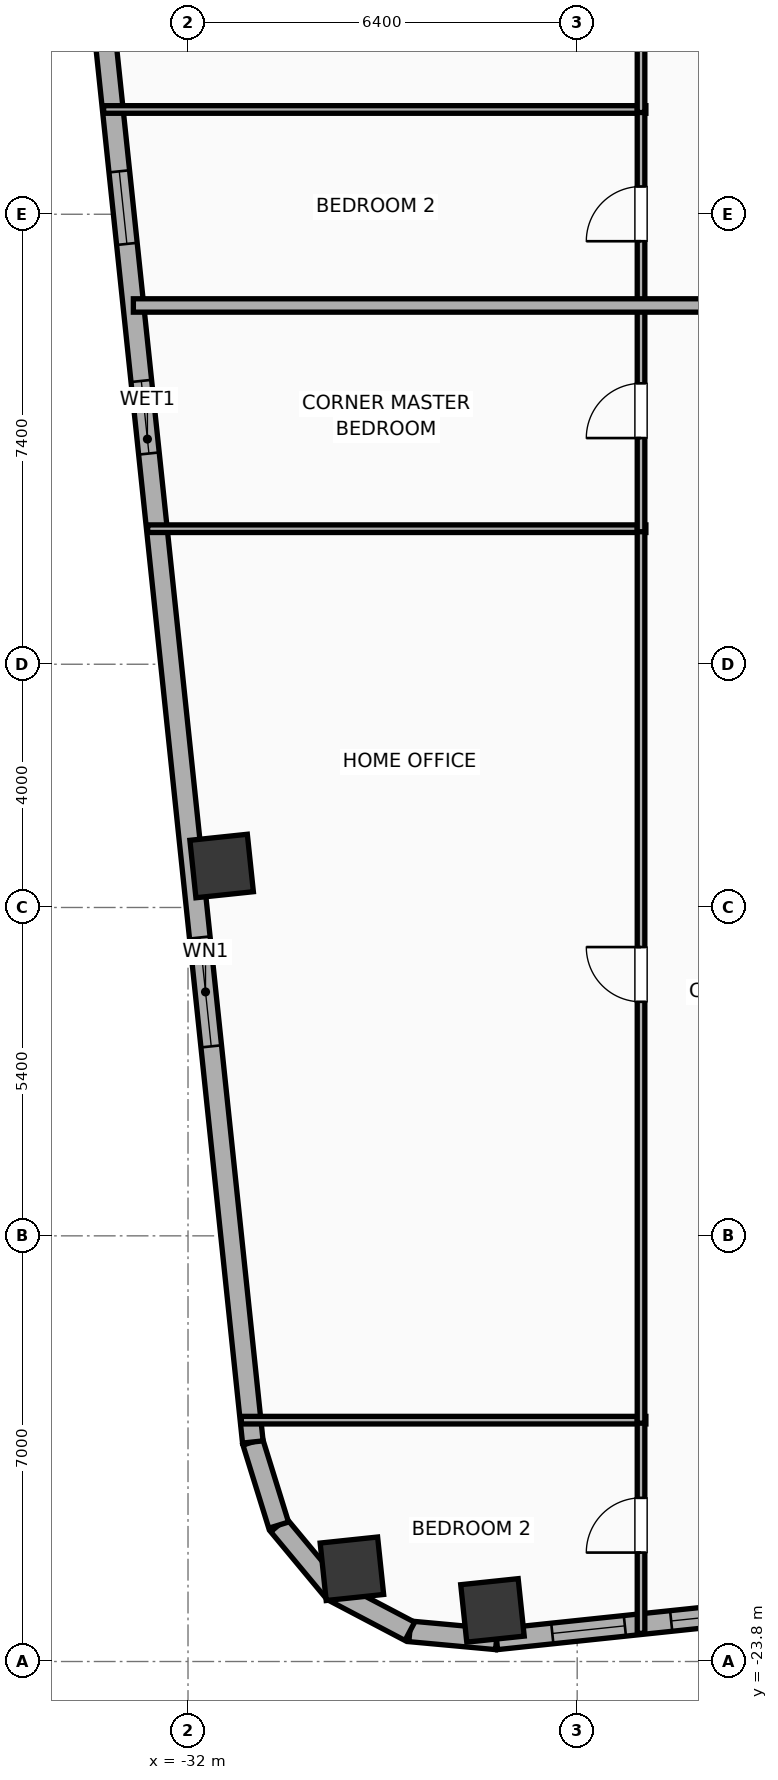
"""IFC4 building model, lengths in metres.
Left out: names, types, materials, properties, quantities, classifications, styles, units other than length and angle.
Written with IfcOpenShell. Run it as: python <this file> out.ifc"""

import sys

from ifc_helpers import new_model, si_unit, direction, frame, frame_2d, origin, origin_2d, place, context, subcontext, project, spatial, rectangle, hollow_rectangle, hollow_circle, extrude, element, fill, save


model = new_model("IFC4")
c1 = context("Model", 3, precision=1e-05, world=origin(), true_north=direction((0.0, 1.0)))
c2 = subcontext(c1, "Body", "Model", "MODEL_VIEW")
j1 = project(units=[si_unit("LENGTHUNIT", "METRE"), si_unit("PLANEANGLEUNIT", "RADIAN")], contexts=[c1])
p1 = place(None, origin())
s1 = spatial("IfcSite", under=j1, at=p1, CompositionType="ELEMENT")
p2 = place(p1, origin())
s2 = spatial("IfcBuilding", under=s1, at=p2, CompositionType="ELEMENT")
p3 = place(p2, frame((0.0, 0.0, 163.8)))
s3 = spatial("IfcBuildingStorey", under=s2, at=p3, CompositionType="ELEMENT", Elevation=163.8)
for number, where, z_axis, x_axis in (
    (1, (-26.993, -22.959, 0.0), (0.0, 0.0, 1.0), (0.995, 0.105, 0.0)),
    (2, (-31.447, -10.718, 0.0), (0.0, 0.0, 1.0), (0.995, 0.105, 0.0)),
):
    element("IfcColumn", number, at=place(p3, frame(where, z_axis=z_axis, x_axis=x_axis)), inside=s3, PredefinedType="COLUMN", context=c2, shape_type="SweptSolid", body=[
        extrude(hollow_rectangle(XDim=0.95, YDim=0.95, WallThickness=0.032, at=origin_2d()), origin(), (0.0, 0.0, 1.0), 3.9),
    ])
p4 = place(p3, frame((-29.305, -22.275, 0.0), z_axis=(0.0, 0.0, 1.0), x_axis=(0.994521895368, 0.104528463268, 0.0)))
e3 = element("IfcColumn", 3, at=p4, inside=s3, PredefinedType="COLUMN", context=c2, shape_type="SweptSolid", body=[
    extrude(hollow_circle(Radius=0.475, WallThickness=0.032, at=origin_2d()), origin(), (0.0, 0.0, 1.0), 3.9),
])
p5 = place(p3, frame((24.756, -18.003, 0.0), z_axis=(0.0, 0.0, 1.0), x_axis=(-0.99452160744, -0.104531202687, 0.0)))
e4 = element("IfcWall", 4, at=p5, inside=s3, PredefinedType="ELEMENTEDWALL", context=c2, shape_type="SweptSolid", body=[
    extrude(rectangle(XDim=51.967, YDim=0.34, at=frame_2d((25.983, 0.0))), origin(), (0.0, 0.0, 1.0), 3.65),
])
p6 = place(p5, frame((25.633, 0.0, 0.75)))
e5 = element("IfcOpeningElement", 5, at=p6, cuts=e4, PredefinedType="OPENING", context=c2, shape_type="SweptSolid", body=[
    extrude(rectangle(XDim=2.4, YDim=2.1, at=frame_2d((1.2, 1.05))), frame((0.0, 0.18, 0.0), z_axis=(0.0, -1.0, 0.0), x_axis=(1.0, 0.0, 0.0)), (0.0, 0.0, 1.0), 0.36),
])
p7 = place(p5, frame((42.369, 0.0, 0.75)))
e6 = element("IfcOpeningElement", 6, at=p7, cuts=e4, PredefinedType="OPENING", context=c2, shape_type="SweptSolid", body=[
    extrude(rectangle(XDim=1.2, YDim=2.05, at=frame_2d((0.6, 1.025))), frame((0.0, 0.18, 0.0), z_axis=(0.0, -1.0, 0.0), x_axis=(1.0, 0.0, 0.0)), (0.0, 0.0, 1.0), 0.36),
])
p8 = place(p5, frame((34.085, 0.0, 0.75)))
e7 = element("IfcOpeningElement", 7, at=p8, cuts=e4, PredefinedType="OPENING", context=c2, shape_type="SweptSolid", body=[
    extrude(rectangle(XDim=1.2, YDim=2.05, at=frame_2d((0.6, 1.025))), frame((0.0, 0.18, 0.0), z_axis=(0.0, -1.0, 0.0), x_axis=(1.0, 0.0, 0.0)), (0.0, 0.0, 1.0), 0.36),
])
p9 = place(p5, frame((36.993, 0.0, 0.75)))
e8 = element("IfcOpeningElement", 8, at=p9, cuts=e4, PredefinedType="OPENING", context=c2, shape_type="SweptSolid", body=[
    extrude(rectangle(XDim=1.2, YDim=2.05, at=frame_2d((0.6, 1.025))), frame((0.0, 0.18, 0.0), z_axis=(0.0, -1.0, 0.0), x_axis=(1.0, 0.0, 0.0)), (0.0, 0.0, 1.0), 0.36),
])
p10 = place(p5, frame((14.397, 0.0, 0.75)))
e9 = element("IfcOpeningElement", 9, at=p10, cuts=e4, PredefinedType="OPENING", context=c2, shape_type="SweptSolid", body=[
    extrude(rectangle(XDim=1.2, YDim=2.05, at=frame_2d((0.6, 1.025))), frame((0.0, 0.18, 0.0), z_axis=(0.0, -1.0, 0.0), x_axis=(1.0, 0.0, 0.0)), (0.0, 0.0, 1.0), 0.36),
])
p11 = place(p5, frame((11.489, 0.0, 0.75)))
e10 = element("IfcOpeningElement", 10, at=p11, cuts=e4, PredefinedType="OPENING", context=c2, shape_type="SweptSolid", body=[
    extrude(rectangle(XDim=1.2, YDim=2.05, at=frame_2d((0.6, 1.025))), frame((0.0, 0.18, 0.0), z_axis=(0.0, -1.0, 0.0), x_axis=(1.0, 0.0, 0.0)), (0.0, 0.0, 1.0), 0.36),
])
p12 = place(p5, frame((8.521, 0.0, 0.75)))
e11 = element("IfcOpeningElement", 11, at=p12, cuts=e4, PredefinedType="OPENING", context=c2, shape_type="SweptSolid", body=[
    extrude(rectangle(XDim=1.2, YDim=2.05, at=frame_2d((0.6, 1.025))), frame((0.0, 0.18, 0.0), z_axis=(0.0, -1.0, 0.0), x_axis=(1.0, 0.0, 0.0)), (0.0, 0.0, 1.0), 0.36),
])
p13 = place(p5, frame((5.582, 0.0, 0.75)))
e12 = element("IfcOpeningElement", 12, at=p13, cuts=e4, PredefinedType="OPENING", context=c2, shape_type="SweptSolid", body=[
    extrude(rectangle(XDim=1.2, YDim=2.05, at=frame_2d((0.6, 1.025))), frame((0.0, 0.18, 0.0), z_axis=(0.0, -1.0, 0.0), x_axis=(1.0, 0.0, 0.0)), (0.0, 0.0, 1.0), 0.36),
])
p14 = place(p5, frame((29.313, 0.0, 0.75)))
e13 = element("IfcOpeningElement", 13, at=p14, cuts=e4, PredefinedType="OPENING", context=c2, shape_type="SweptSolid", body=[
    extrude(rectangle(XDim=1.2, YDim=2.05, at=frame_2d((0.6, 1.025))), frame((0.0, 0.18, 0.0), z_axis=(0.0, -1.0, 0.0), x_axis=(1.0, 0.0, 0.0)), (0.0, 0.0, 1.0), 0.36),
])
p15 = place(p5, frame((22.248, 0.0, 0.75)))
e14 = element("IfcOpeningElement", 14, at=p15, cuts=e4, PredefinedType="OPENING", context=c2, shape_type="SweptSolid", body=[
    extrude(rectangle(XDim=1.2, YDim=2.05, at=frame_2d((0.6, 1.025))), frame((0.0, 0.18, 0.0), z_axis=(0.0, -1.0, 0.0), x_axis=(1.0, 0.0, 0.0)), (0.0, 0.0, 1.0), 0.36),
])
p16 = place(p5, frame((18.186, 0.0, 0.75)))
e15 = element("IfcOpeningElement", 15, at=p16, cuts=e4, PredefinedType="OPENING", context=c2, shape_type="SweptSolid", body=[
    extrude(rectangle(XDim=1.2, YDim=2.05, at=frame_2d((0.6, 1.025))), frame((0.0, 0.18, 0.0), z_axis=(0.0, -1.0, 0.0), x_axis=(1.0, 0.0, 0.0)), (0.0, 0.0, 1.0), 0.36),
])
p17 = place(p5, frame((47.879, 0.0, 0.75)))
e16 = element("IfcOpeningElement", 16, at=p17, cuts=e4, PredefinedType="OPENING", context=c2, shape_type="SweptSolid", body=[
    extrude(rectangle(XDim=1.2, YDim=2.05, at=frame_2d((0.6, 1.025))), frame((0.0, 0.18, 0.0), z_axis=(0.0, -1.0, 0.0), x_axis=(1.0, 0.0, 0.0)), (0.0, 0.0, 1.0), 0.36),
])
p18 = place(p5, frame((49.844, 0.0, 0.75)))
e17 = element("IfcOpeningElement", 17, at=p18, cuts=e4, PredefinedType="OPENING", context=c2, shape_type="SweptSolid", body=[
    extrude(rectangle(XDim=1.2, YDim=2.05, at=frame_2d((0.6, 1.025))), frame((0.0, 0.18, 0.0), z_axis=(0.0, -1.0, 0.0), x_axis=(1.0, 0.0, 0.0)), (0.0, 0.0, 1.0), 0.36),
])
p19 = place(p3, frame((-26.926, -23.435, 0.0), z_axis=(0.0, 0.0, 1.0), x_axis=(-0.995800460351, 0.091550222087, 0.0)))
e18 = element("IfcWall", 18, at=p19, inside=s3, PredefinedType="ELEMENTEDWALL", context=c2, shape_type="SweptSolid", body=[
    extrude(rectangle(XDim=1.432, YDim=0.34, at=frame_2d((0.716, 0.0))), origin(), (0.0, 0.0, 1.0), 3.65),
])
p20 = place(p3, frame((-28.352, -23.304, 0.0), z_axis=(0.0, 0.0, 1.0), x_axis=(-0.884989312682, 0.465611336243, 0.0)))
e19 = element("IfcWall", 19, at=p20, inside=s3, PredefinedType="ELEMENTEDWALL", context=c2, shape_type="SweptSolid", body=[
    extrude(rectangle(XDim=1.415, YDim=0.34, at=frame_2d((0.708, 0.0))), origin(), (0.0, 0.0, 1.0), 3.65),
])
p21 = place(p3, frame((-29.605, -22.645, 0.0), z_axis=(0.0, 0.0, 1.0), x_axis=(-0.639437361921, 0.768843196093, 0.0)))
e20 = element("IfcWall", 20, at=p21, inside=s3, PredefinedType="ELEMENTEDWALL", context=c2, shape_type="SweptSolid", body=[
    extrude(rectangle(XDim=1.415, YDim=0.34, at=frame_2d((0.708, 0.0))), origin(), (0.0, 0.0, 1.0), 3.65),
])
p22 = place(p3, frame((-30.51, -21.557, 0.0), z_axis=(0.0, 0.0, 1.0), x_axis=(-0.296624409546, 0.9549942197, 0.0)))
e21 = element("IfcWall", 21, at=p22, inside=s3, PredefinedType="ELEMENTEDWALL", context=c2, shape_type="SweptSolid", body=[
    extrude(rectangle(XDim=1.432, YDim=0.34, at=frame_2d((0.716, 0.0))), origin(), (0.0, 0.0, 1.0), 3.65),
])
p23 = place(p3, frame((-30.934, -20.19, 0.0), z_axis=(0.0, 0.0, 1.0), x_axis=(-0.10452691388, 0.994522058214, 0.0)))
e22 = element("IfcWall", 22, at=p23, inside=s3, PredefinedType="ELEMENTEDWALL", context=c2, shape_type="SweptSolid", body=[
    extrude(rectangle(XDim=33.167, YDim=0.34, at=frame_2d((16.583, 0.0))), origin(), (0.0, 0.0, 1.0), 3.65),
])
p24 = place(p23, frame((6.542, 0.0, 0.75)))
e23 = element("IfcOpeningElement", 23, at=p24, cuts=e22, PredefinedType="OPENING", context=c2, shape_type="SweptSolid", body=[
    extrude(rectangle(XDim=1.8, YDim=2.1, at=frame_2d((0.9, 1.05))), frame((0.0, 0.18, 0.0), z_axis=(0.0, -1.0, 0.0), x_axis=(1.0, 0.0, 0.0)), (0.0, 0.0, 1.0), 0.36),
])
p25 = place(p23, frame((24.825, 0.0, 0.75)))
e24 = element("IfcOpeningElement", 24, at=p25, cuts=e22, PredefinedType="OPENING", context=c2, shape_type="SweptSolid", body=[
    extrude(rectangle(XDim=1.8, YDim=2.1, at=frame_2d((0.9, 1.05))), frame((0.0, 0.18, 0.0), z_axis=(0.0, -1.0, 0.0), x_axis=(1.0, 0.0, 0.0)), (0.0, 0.0, 1.0), 0.36),
])
p26 = place(p23, frame((16.344, 0.0, 0.75)))
e25 = element("IfcOpeningElement", 25, at=p26, cuts=e22, PredefinedType="OPENING", context=c2, shape_type="SweptSolid", body=[
    extrude(rectangle(XDim=1.2, YDim=2.05, at=frame_2d((0.6, 1.025))), frame((0.0, 0.18, 0.0), z_axis=(0.0, -1.0, 0.0), x_axis=(1.0, 0.0, 0.0)), (0.0, 0.0, 1.0), 0.36),
])
p27 = place(p23, frame((19.811, 0.0, 0.75)))
e26 = element("IfcOpeningElement", 26, at=p27, cuts=e22, PredefinedType="OPENING", context=c2, shape_type="SweptSolid", body=[
    extrude(rectangle(XDim=1.2, YDim=2.05, at=frame_2d((0.6, 1.025))), frame((0.0, 0.18, 0.0), z_axis=(0.0, -1.0, 0.0), x_axis=(1.0, 0.0, 0.0)), (0.0, 0.0, 1.0), 0.36),
])
p28 = place(p3, frame((-31.123, -19.831, 0.0), z_axis=(0.0, 0.0, 1.0), x_axis=(1.0, 0.0, 0.0)))
e27 = element("IfcWall", 27, at=p28, inside=s3, PredefinedType="PARTITIONING", context=c2, shape_type="SweptSolid", body=[
    extrude(rectangle(XDim=6.653, YDim=0.125, at=frame_2d((3.326, 0.0))), origin(), (0.0, 0.0, 1.0), 3.65),
])
p29 = place(p3, frame((-32.664, -5.171, 0.0), z_axis=(0.0, 0.0, 1.0), x_axis=(1.0, 0.0, 0.0)))
e28 = element("IfcWall", 28, at=p29, inside=s3, PredefinedType="PARTITIONING", context=c2, shape_type="SweptSolid", body=[
    extrude(rectangle(XDim=8.194, YDim=0.125, at=frame_2d((4.097, 0.0))), origin(), (0.0, 0.0, 1.0), 3.65),
])
p30 = place(p3, frame((-24.55, -23.336, 0.0), z_axis=(0.0, 0.0, 1.0), x_axis=(0.0, 1.0, 0.0)))
e29 = element("IfcWall", 29, at=p30, inside=s3, PredefinedType="PARTITIONING", context=c2, shape_type="SweptSolid", body=[
    extrude(rectangle(XDim=3.555, YDim=0.125, at=frame_2d((1.778, 0.0))), origin(), (0.0, 0.0, 1.0), 3.65),
])
p31 = place(p30, frame((1.328, 0.0, 0.0)))
e30 = element("IfcOpeningElement", 30, at=p31, cuts=e29, PredefinedType="OPENING", context=c2, shape_type="SweptSolid", body=[
    extrude(rectangle(XDim=0.9, YDim=2.05, at=frame_2d((0.45, 1.025))), frame((0.0, 0.073, 0.0), z_axis=(0.0, -1.0, 0.0), x_axis=(1.0, 0.0, 0.0)), (0.0, 0.0, 1.0), 0.145),
])
p32 = place(p3, frame((-24.55, -19.881, 0.0), z_axis=(0.0, 0.0, 1.0), x_axis=(0.0, 1.0, 0.0)))
e31 = element("IfcWall", 31, at=p32, inside=s3, PredefinedType="PARTITIONING", context=c2, shape_type="SweptSolid", body=[
    extrude(rectangle(XDim=14.76, YDim=0.125, at=frame_2d((7.38, 0.0))), origin(), (0.0, 0.0, 1.0), 3.65),
])
p33 = place(p32, frame((6.93, 0.0, 0.0)))
e32 = element("IfcOpeningElement", 32, at=p33, cuts=e31, PredefinedType="OPENING", context=c2, shape_type="SweptSolid", body=[
    extrude(rectangle(XDim=0.9, YDim=2.05, at=frame_2d((0.45, 1.025))), frame((0.0, 0.073, 0.0), z_axis=(0.0, -1.0, 0.0), x_axis=(1.0, 0.0, 0.0)), (0.0, 0.0, 1.0), 0.145),
])
p34 = place(p3, frame((-24.55, -5.221, 0.0), z_axis=(0.0, 0.0, 1.0), x_axis=(0.0, 1.0, 0.0)))
e33 = element("IfcWall", 33, at=p34, inside=s3, PredefinedType="PARTITIONING", context=c2, shape_type="SweptSolid", body=[
    extrude(rectangle(XDim=3.783, YDim=0.125, at=frame_2d((1.892, 0.0))), origin(), (0.0, 0.0, 1.0), 3.65),
])
p35 = place(p34, frame((1.541, 0.0, 0.0)))
e34 = element("IfcOpeningElement", 34, at=p35, cuts=e33, PredefinedType="OPENING", context=c2, shape_type="SweptSolid", body=[
    extrude(rectangle(XDim=0.9, YDim=2.05, at=frame_2d((0.45, 1.025))), frame((0.0, 0.073, 0.0), z_axis=(0.0, -1.0, 0.0), x_axis=(1.0, 0.0, 0.0)), (0.0, 0.0, 1.0), 0.145),
])
p36 = place(p3, frame((-33.388, 1.723, 0.0), z_axis=(0.0, 0.0, 1.0), x_axis=(1.0, 0.0, 0.0)))
e35 = element("IfcWall", 35, at=p36, inside=s3, PredefinedType="PARTITIONING", context=c2, shape_type="SweptSolid", body=[
    extrude(rectangle(XDim=8.918, YDim=0.125, at=frame_2d((4.459, 0.0))), origin(), (0.0, 0.0, 1.0), 3.65),
])
p37 = place(p3, frame((-24.55, -1.562, 0.0), z_axis=(0.0, 0.0, 1.0), x_axis=(0.0, 1.0, 0.0)))
e36 = element("IfcWall", 36, at=p37, inside=s3, PredefinedType="PARTITIONING", context=c2, shape_type="SweptSolid", body=[
    extrude(rectangle(XDim=3.335, YDim=0.125, at=frame_2d((1.668, 0.0))), origin(), (0.0, 0.0, 1.0), 3.65),
])
p38 = place(p37, frame((1.119, 0.0, 0.0)))
e37 = element("IfcOpeningElement", 37, at=p38, cuts=e36, PredefinedType="OPENING", context=c2, shape_type="SweptSolid", body=[
    extrude(rectangle(XDim=0.9, YDim=2.05, at=frame_2d((0.45, 1.025))), frame((0.0, 0.073, 0.0), z_axis=(0.0, -1.0, 0.0), x_axis=(1.0, 0.0, 0.0)), (0.0, 0.0, 1.0), 0.145),
])
p39 = place(p3, frame((-24.55, 1.673, 0.0), z_axis=(0.0, 0.0, 1.0), x_axis=(0.0, 1.0, 0.0)))
e38 = element("IfcWall", 38, at=p39, inside=s3, PredefinedType="PARTITIONING", context=c2, shape_type="SweptSolid", body=[
    extrude(rectangle(XDim=12.942, YDim=0.125, at=frame_2d((6.471, 0.0))), origin(), (0.0, 0.0, 1.0), 3.65),
])
p40 = place(p39, frame((6.021, 0.0, 0.0)))
e39 = element("IfcOpeningElement", 39, at=p40, cuts=e38, PredefinedType="OPENING", context=c2, shape_type="SweptSolid", body=[
    extrude(rectangle(XDim=0.9, YDim=2.05, at=frame_2d((0.45, 1.025))), frame((0.0, 0.073, 0.0), z_axis=(0.0, -1.0, 0.0), x_axis=(1.0, 0.0, 0.0)), (0.0, 0.0, 1.0), 0.145),
])
p41 = place(p3, frame((-19.72, -1.5, 0.0), z_axis=(0.0, 0.0, 1.0), x_axis=(-1.0, 0.0, 0.0)))
e40 = element("IfcWall", 40, at=p41, inside=s3, PredefinedType="PARTITIONING", context=c2, shape_type="SweptSolid", body=[
    extrude(rectangle(XDim=13.179, YDim=0.22, at=frame_2d((6.589, 0.0))), origin(), (0.0, 0.0, 1.0), 3.65),
])
p42 = place(p24, origin())
e41 = element("IfcWindow", 41, at=p42, inside=s3, PartitioningType="SINGLE_PANEL", PredefinedType="WINDOW", context=c2, shape_type="SweptSolid", body=[
    extrude(rectangle(XDim=1.8, YDim=2.1, at=frame_2d((0.9, 1.05))), frame((0.0, 0.03, 0.0), z_axis=(0.0, -1.0, 0.0), x_axis=(1.0, 0.0, 0.0)), (0.0, 0.0, 1.0), 0.06),
])
fill(e23, e41)
p43 = place(p17, origin())
e42 = element("IfcWindow", 42, at=p43, inside=s3, PartitioningType="SINGLE_PANEL", PredefinedType="WINDOW", context=c2, shape_type="SweptSolid", body=[
    extrude(rectangle(XDim=1.2, YDim=2.05, at=frame_2d((0.6, 1.025))), frame((0.0, 0.03, 0.0), z_axis=(0.0, -1.0, 0.0), x_axis=(1.0, 0.0, 0.0)), (0.0, 0.0, 1.0), 0.06),
])
fill(e16, e42)
p44 = place(p26, origin())
e43 = element("IfcWindow", 43, at=p44, inside=s3, PartitioningType="SINGLE_PANEL", PredefinedType="WINDOW", context=c2, shape_type="SweptSolid", body=[
    extrude(rectangle(XDim=1.2, YDim=2.05, at=frame_2d((0.6, 1.025))), frame((0.0, 0.03, 0.0), z_axis=(0.0, -1.0, 0.0), x_axis=(1.0, 0.0, 0.0)), (0.0, 0.0, 1.0), 0.06),
])
fill(e25, e43)
p45 = place(p18, origin())
e44 = element("IfcWindow", 44, at=p45, inside=s3, PartitioningType="SINGLE_PANEL", PredefinedType="WINDOW", context=c2, shape_type="SweptSolid", body=[
    extrude(rectangle(XDim=1.2, YDim=2.05, at=frame_2d((0.6, 1.025))), frame((0.0, 0.03, 0.0), z_axis=(0.0, -1.0, 0.0), x_axis=(1.0, 0.0, 0.0)), (0.0, 0.0, 1.0), 0.06),
])
fill(e17, e44)
p46 = place(p27, origin())
e45 = element("IfcWindow", 45, at=p46, inside=s3, PartitioningType="SINGLE_PANEL", PredefinedType="WINDOW", context=c2, shape_type="SweptSolid", body=[
    extrude(rectangle(XDim=1.2, YDim=2.05, at=frame_2d((0.6, 1.025))), frame((0.0, 0.03, 0.0), z_axis=(0.0, -1.0, 0.0), x_axis=(1.0, 0.0, 0.0)), (0.0, 0.0, 1.0), 0.06),
])
fill(e26, e45)
p47 = place(p31, origin())
e46 = element("IfcDoor", 46, at=p47, inside=s3, OperationType="SINGLE_SWING_LEFT", PredefinedType="DOOR", context=c2, shape_type="SweptSolid", body=[
    extrude(rectangle(XDim=0.9, YDim=2.05, at=frame_2d((0.45, 1.025))), frame((0.0, 0.025, 0.0), z_axis=(0.0, -1.0, 0.0), x_axis=(1.0, 0.0, 0.0)), (0.0, 0.0, 1.0), 0.05),
])
fill(e30, e46)
p48 = place(p33, origin())
e47 = element("IfcDoor", 47, at=p48, inside=s3, OperationType="SINGLE_SWING_RIGHT", PredefinedType="DOOR", context=c2, shape_type="SweptSolid", body=[
    extrude(rectangle(XDim=0.9, YDim=2.05, at=frame_2d((0.45, 1.025))), frame((0.0, 0.025, 0.0), z_axis=(0.0, -1.0, 0.0), x_axis=(1.0, 0.0, 0.0)), (0.0, 0.0, 1.0), 0.05),
])
fill(e32, e47)
p49 = place(p35, origin())
e48 = element("IfcDoor", 48, at=p49, inside=s3, OperationType="SINGLE_SWING_LEFT", PredefinedType="DOOR", context=c2, shape_type="SweptSolid", body=[
    extrude(rectangle(XDim=0.9, YDim=2.05, at=frame_2d((0.45, 1.025))), frame((0.0, 0.025, 0.0), z_axis=(0.0, -1.0, 0.0), x_axis=(1.0, 0.0, 0.0)), (0.0, 0.0, 1.0), 0.05),
])
fill(e34, e48)
p50 = place(p38, origin())
e49 = element("IfcDoor", 49, at=p50, inside=s3, OperationType="SINGLE_SWING_LEFT", PredefinedType="DOOR", context=c2, shape_type="SweptSolid", body=[
    extrude(rectangle(XDim=0.9, YDim=2.05, at=frame_2d((0.45, 1.025))), frame((0.0, 0.025, 0.0), z_axis=(0.0, -1.0, 0.0), x_axis=(1.0, 0.0, 0.0)), (0.0, 0.0, 1.0), 0.05),
])
fill(e37, e49)
save(model, sys.argv[1])
